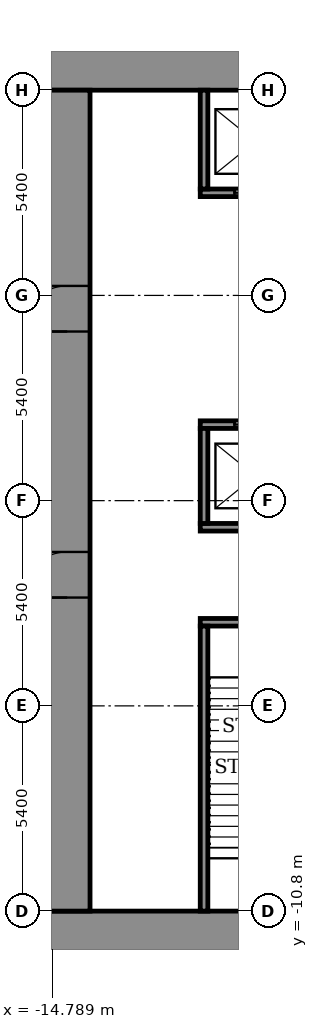
"""IFC4 building model, lengths in metres.
Left out: names, types, materials, properties, quantities, classifications, styles, units other than length and angle.
Written with IfcOpenShell. Run it as: python <this file> out.ifc"""

import sys

from ifc_helpers import new_model, si_unit, direction, frame, frame_2d, origin, place, context, subcontext, project, spatial, rectangle, extrude, element, fill, save


model = new_model("IFC4")
c1 = context("Model", 3, precision=1e-05, world=origin(), true_north=direction((0.0, 1.0)))
c2 = subcontext(c1, "Body", "Model", "MODEL_VIEW")
j1 = project(units=[si_unit("LENGTHUNIT", "METRE"), si_unit("PLANEANGLEUNIT", "RADIAN")], contexts=[c1])
p1 = place(None, origin())
s1 = spatial("IfcSite", under=j1, at=p1, CompositionType="ELEMENT")
p2 = place(p1, origin())
s2 = spatial("IfcBuilding", under=s1, at=p2, CompositionType="ELEMENT")
p3 = place(p2, origin())
s3 = spatial("IfcBuildingStorey", under=s2, at=p3, CompositionType="ELEMENT", Elevation=0.0)
p4 = place(p3, frame((-15.0, -11.4, 0.0), z_axis=(0.0, 0.0, 1.0), x_axis=(1.0, 0.0, 0.0)))
e1 = element("IfcWall", 1, at=p4, inside=s3, PredefinedType="SHEAR", context=c2, shape_type="SweptSolid", body=[
    extrude(rectangle(XDim=30.0, YDim=1.2, at=frame_2d((15.0, 0.0))), origin(), (0.0, 0.0, 1.0), 6.0),
])
p5 = place(p4, frame((5.725, 0.0, 0.0)))
e2 = element("IfcOpeningElement", 2, at=p5, cuts=e1, PredefinedType="OPENING", context=c2, shape_type="SweptSolid", body=[
    extrude(rectangle(XDim=1.5, YDim=2.1, at=frame_2d((0.75, 1.05))), frame((0.0, 0.61, 0.0), z_axis=(0.0, -1.0, 0.0), x_axis=(1.0, 0.0, 0.0)), (0.0, 0.0, 1.0), 1.22),
])
p6 = place(p4, frame((14.975, 0.0, 0.0)))
e3 = element("IfcOpeningElement", 3, at=p6, cuts=e1, PredefinedType="OPENING", context=c2, shape_type="SweptSolid", body=[
    extrude(rectangle(XDim=1.5, YDim=2.1, at=frame_2d((0.75, 1.05))), frame((0.0, 0.61, 0.0), z_axis=(0.0, -1.0, 0.0), x_axis=(1.0, 0.0, 0.0)), (0.0, 0.0, 1.0), 1.22),
])
p7 = place(p4, frame((24.275, 0.0, 0.0)))
e4 = element("IfcOpeningElement", 4, at=p7, cuts=e1, PredefinedType="OPENING", context=c2, shape_type="SweptSolid", body=[
    extrude(rectangle(XDim=1.5, YDim=2.1, at=frame_2d((0.75, 1.05))), frame((0.0, 0.61, 0.0), z_axis=(0.0, -1.0, 0.0), x_axis=(1.0, 0.0, 0.0)), (0.0, 0.0, 1.0), 1.22),
])
p8 = place(p3, frame((-15.0, 11.4, 0.0), z_axis=(0.0, 0.0, 1.0), x_axis=(1.0, 0.0, 0.0)))
e5 = element("IfcWall", 5, at=p8, inside=s3, PredefinedType="SHEAR", context=c2, shape_type="SweptSolid", body=[
    extrude(rectangle(XDim=30.0, YDim=1.2, at=frame_2d((15.0, 0.0))), origin(), (0.0, 0.0, 1.0), 6.0),
])
p9 = place(p3, frame((-14.4, -10.8, 0.0), z_axis=(0.0, 0.0, 1.0), x_axis=(0.0, 1.0, 0.0)))
e6 = element("IfcWall", 6, at=p9, inside=s3, PredefinedType="SHEAR", context=c2, shape_type="SweptSolid", body=[
    extrude(rectangle(XDim=21.6, YDim=1.2, at=frame_2d((10.8, 0.0))), origin(), (0.0, 0.0, 1.0), 6.0),
])
p10 = place(p9, frame((8.25, 0.0, 0.0)))
e7 = element("IfcOpeningElement", 7, at=p10, cuts=e6, PredefinedType="OPENING", context=c2, shape_type="SweptSolid", body=[
    extrude(rectangle(XDim=1.2, YDim=2.1, at=frame_2d((0.6, 1.05))), frame((0.0, 0.61, 0.0), z_axis=(0.0, -1.0, 0.0), x_axis=(1.0, 0.0, 0.0)), (0.0, 0.0, 1.0), 1.22),
])
p11 = place(p9, frame((15.25, 0.0, 0.0)))
e8 = element("IfcOpeningElement", 8, at=p11, cuts=e6, PredefinedType="OPENING", context=c2, shape_type="SweptSolid", body=[
    extrude(rectangle(XDim=1.2, YDim=2.1, at=frame_2d((0.6, 1.05))), frame((0.0, 0.61, 0.0), z_axis=(0.0, -1.0, 0.0), x_axis=(1.0, 0.0, 0.0)), (0.0, 0.0, 1.0), 1.22),
])
p12 = place(p3, frame((-10.9, -3.2, 0.0), z_axis=(0.0, 0.0, 1.0), x_axis=(1.0, 0.0, 0.0)))
e9 = element("IfcWall", 9, at=p12, inside=s3, PredefinedType="SHEAR", context=c2, shape_type="SweptSolid", body=[
    extrude(rectangle(XDim=21.8, YDim=0.2, at=frame_2d((10.9, 0.0))), origin(), (0.0, 0.0, 1.0), 5.45),
])
p13 = place(p12, frame((1.075, 0.0, 0.0)))
e10 = element("IfcOpeningElement", 10, at=p13, cuts=e9, PredefinedType="OPENING", context=c2, shape_type="SweptSolid", body=[
    extrude(rectangle(XDim=1.1, YDim=2.1, at=frame_2d((0.55, 1.05))), frame((0.0, 0.11, 0.0), z_axis=(0.0, -1.0, 0.0), x_axis=(1.0, 0.0, 0.0)), (0.0, 0.0, 1.0), 0.22),
])
p14 = place(p12, frame((10.325, 0.0, 0.0)))
e11 = element("IfcOpeningElement", 11, at=p14, cuts=e9, PredefinedType="OPENING", context=c2, shape_type="SweptSolid", body=[
    extrude(rectangle(XDim=1.1, YDim=2.1, at=frame_2d((0.55, 1.05))), frame((0.0, 0.11, 0.0), z_axis=(0.0, -1.0, 0.0), x_axis=(1.0, 0.0, 0.0)), (0.0, 0.0, 1.0), 0.22),
])
p15 = place(p12, frame((19.625, 0.0, 0.0)))
e12 = element("IfcOpeningElement", 12, at=p15, cuts=e9, PredefinedType="OPENING", context=c2, shape_type="SweptSolid", body=[
    extrude(rectangle(XDim=1.1, YDim=2.1, at=frame_2d((0.55, 1.05))), frame((0.0, 0.11, 0.0), z_axis=(0.0, -1.0, 0.0), x_axis=(1.0, 0.0, 0.0)), (0.0, 0.0, 1.0), 0.22),
])
p16 = place(p12, frame((5.7, 0.0, 0.0)))
e13 = element("IfcOpeningElement", 13, at=p16, cuts=e9, PredefinedType="OPENING", context=c2, shape_type="SweptSolid", body=[
    extrude(rectangle(XDim=1.1, YDim=2.1, at=frame_2d((0.55, 1.05))), frame((0.0, 0.11, 0.0), z_axis=(0.0, -1.0, 0.0), x_axis=(1.0, 0.0, 0.0)), (0.0, 0.0, 1.0), 0.22),
])
p17 = place(p12, frame((14.975, 0.0, 0.0)))
e14 = element("IfcOpeningElement", 14, at=p17, cuts=e9, PredefinedType="OPENING", context=c2, shape_type="SweptSolid", body=[
    extrude(rectangle(XDim=1.1, YDim=2.1, at=frame_2d((0.55, 1.05))), frame((0.0, 0.11, 0.0), z_axis=(0.0, -1.0, 0.0), x_axis=(1.0, 0.0, 0.0)), (0.0, 0.0, 1.0), 0.22),
])
p18 = place(p3, frame((-10.9, -0.7, 0.0), z_axis=(0.0, 0.0, 1.0), x_axis=(1.0, 0.0, 0.0)))
e15 = element("IfcWall", 15, at=p18, inside=s3, PredefinedType="SHEAR", context=c2, shape_type="SweptSolid", body=[
    extrude(rectangle(XDim=21.8, YDim=0.2, at=frame_2d((10.9, 0.0))), origin(), (0.0, 0.0, 1.0), 5.45),
])
p19 = place(p3, frame((-10.9, 2.0, 0.0), z_axis=(0.0, 0.0, 1.0), x_axis=(1.0, 0.0, 0.0)))
e16 = element("IfcWall", 16, at=p19, inside=s3, PredefinedType="SHEAR", context=c2, shape_type="SweptSolid", body=[
    extrude(rectangle(XDim=21.8, YDim=0.2, at=frame_2d((10.9, 0.0))), origin(), (0.0, 0.0, 1.0), 5.45),
])
p20 = place(p19, frame((0.9, 0.0, 0.0)))
e17 = element("IfcOpeningElement", 17, at=p20, cuts=e16, PredefinedType="OPENING", context=c2, shape_type="SweptSolid", body=[
    extrude(rectangle(XDim=1.1, YDim=2.1, at=frame_2d((0.55, 1.05))), frame((0.0, 0.11, 0.0), z_axis=(0.0, -1.0, 0.0), x_axis=(1.0, 0.0, 0.0)), (0.0, 0.0, 1.0), 0.22),
])
p21 = place(p19, frame((3.6, 0.0, 0.0)))
e18 = element("IfcOpeningElement", 18, at=p21, cuts=e16, PredefinedType="OPENING", context=c2, shape_type="SweptSolid", body=[
    extrude(rectangle(XDim=1.1, YDim=2.1, at=frame_2d((0.55, 1.05))), frame((0.0, 0.11, 0.0), z_axis=(0.0, -1.0, 0.0), x_axis=(1.0, 0.0, 0.0)), (0.0, 0.0, 1.0), 0.22),
])
p22 = place(p19, frame((6.3, 0.0, 0.0)))
e19 = element("IfcOpeningElement", 19, at=p22, cuts=e16, PredefinedType="OPENING", context=c2, shape_type="SweptSolid", body=[
    extrude(rectangle(XDim=1.1, YDim=2.1, at=frame_2d((0.55, 1.05))), frame((0.0, 0.11, 0.0), z_axis=(0.0, -1.0, 0.0), x_axis=(1.0, 0.0, 0.0)), (0.0, 0.0, 1.0), 0.22),
])
p23 = place(p19, frame((9.0, 0.0, 0.0)))
e20 = element("IfcOpeningElement", 20, at=p23, cuts=e16, PredefinedType="OPENING", context=c2, shape_type="SweptSolid", body=[
    extrude(rectangle(XDim=1.1, YDim=2.1, at=frame_2d((0.55, 1.05))), frame((0.0, 0.11, 0.0), z_axis=(0.0, -1.0, 0.0), x_axis=(1.0, 0.0, 0.0)), (0.0, 0.0, 1.0), 0.22),
])
p24 = place(p19, frame((11.7, 0.0, 0.0)))
e21 = element("IfcOpeningElement", 21, at=p24, cuts=e16, PredefinedType="OPENING", context=c2, shape_type="SweptSolid", body=[
    extrude(rectangle(XDim=1.1, YDim=2.1, at=frame_2d((0.55, 1.05))), frame((0.0, 0.11, 0.0), z_axis=(0.0, -1.0, 0.0), x_axis=(1.0, 0.0, 0.0)), (0.0, 0.0, 1.0), 0.22),
])
p25 = place(p19, frame((17.2, 0.0, 0.0)))
e22 = element("IfcOpeningElement", 22, at=p25, cuts=e16, PredefinedType="OPENING", context=c2, shape_type="SweptSolid", body=[
    extrude(rectangle(XDim=0.9, YDim=2.1, at=frame_2d((0.45, 1.05))), frame((0.0, 0.11, 0.0), z_axis=(0.0, -1.0, 0.0), x_axis=(1.0, 0.0, 0.0)), (0.0, 0.0, 1.0), 0.22),
])
p26 = place(p3, frame((-10.9, 8.1, 0.0), z_axis=(0.0, 0.0, 1.0), x_axis=(1.0, 0.0, 0.0)))
e23 = element("IfcWall", 23, at=p26, inside=s3, PredefinedType="SHEAR", context=c2, shape_type="SweptSolid", body=[
    extrude(rectangle(XDim=21.8, YDim=0.2, at=frame_2d((10.9, 0.0))), origin(), (0.0, 0.0, 1.0), 5.45),
])
p27 = place(p26, frame((0.9, 0.0, 0.0)))
e24 = element("IfcOpeningElement", 24, at=p27, cuts=e23, PredefinedType="OPENING", context=c2, shape_type="SweptSolid", body=[
    extrude(rectangle(XDim=1.1, YDim=2.1, at=frame_2d((0.55, 1.05))), frame((0.0, 0.11, 0.0), z_axis=(0.0, -1.0, 0.0), x_axis=(1.0, 0.0, 0.0)), (0.0, 0.0, 1.0), 0.22),
])
p28 = place(p26, frame((3.6, 0.0, 0.0)))
e25 = element("IfcOpeningElement", 25, at=p28, cuts=e23, PredefinedType="OPENING", context=c2, shape_type="SweptSolid", body=[
    extrude(rectangle(XDim=1.1, YDim=2.1, at=frame_2d((0.55, 1.05))), frame((0.0, 0.11, 0.0), z_axis=(0.0, -1.0, 0.0), x_axis=(1.0, 0.0, 0.0)), (0.0, 0.0, 1.0), 0.22),
])
p29 = place(p26, frame((6.3, 0.0, 0.0)))
e26 = element("IfcOpeningElement", 26, at=p29, cuts=e23, PredefinedType="OPENING", context=c2, shape_type="SweptSolid", body=[
    extrude(rectangle(XDim=1.1, YDim=2.1, at=frame_2d((0.55, 1.05))), frame((0.0, 0.11, 0.0), z_axis=(0.0, -1.0, 0.0), x_axis=(1.0, 0.0, 0.0)), (0.0, 0.0, 1.0), 0.22),
])
p30 = place(p26, frame((9.0, 0.0, 0.0)))
e27 = element("IfcOpeningElement", 27, at=p30, cuts=e23, PredefinedType="OPENING", context=c2, shape_type="SweptSolid", body=[
    extrude(rectangle(XDim=1.1, YDim=2.1, at=frame_2d((0.55, 1.05))), frame((0.0, 0.11, 0.0), z_axis=(0.0, -1.0, 0.0), x_axis=(1.0, 0.0, 0.0)), (0.0, 0.0, 1.0), 0.22),
])
p31 = place(p26, frame((11.7, 0.0, 0.0)))
e28 = element("IfcOpeningElement", 28, at=p31, cuts=e23, PredefinedType="OPENING", context=c2, shape_type="SweptSolid", body=[
    extrude(rectangle(XDim=1.1, YDim=2.1, at=frame_2d((0.55, 1.05))), frame((0.0, 0.11, 0.0), z_axis=(0.0, -1.0, 0.0), x_axis=(1.0, 0.0, 0.0)), (0.0, 0.0, 1.0), 0.22),
])
p32 = place(p26, frame((14.5, 0.0, 0.0)))
e29 = element("IfcOpeningElement", 29, at=p32, cuts=e23, PredefinedType="OPENING", context=c2, shape_type="SweptSolid", body=[
    extrude(rectangle(XDim=0.9, YDim=2.1, at=frame_2d((0.45, 1.05))), frame((0.0, 0.11, 0.0), z_axis=(0.0, -1.0, 0.0), x_axis=(1.0, 0.0, 0.0)), (0.0, 0.0, 1.0), 0.22),
])
p33 = place(p26, frame((18.55, 0.0, 0.0)))
e30 = element("IfcOpeningElement", 30, at=p33, cuts=e23, PredefinedType="OPENING", context=c2, shape_type="SweptSolid", body=[
    extrude(rectangle(XDim=0.9, YDim=2.1, at=frame_2d((0.45, 1.05))), frame((0.0, 0.11, 0.0), z_axis=(0.0, -1.0, 0.0), x_axis=(1.0, 0.0, 0.0)), (0.0, 0.0, 1.0), 0.22),
])
p34 = place(p3, frame((-10.8, -10.8, 0.0), z_axis=(0.0, 0.0, 1.0), x_axis=(0.0, 1.0, 0.0)))
e31 = element("IfcWall", 31, at=p34, inside=s3, PredefinedType="SHEAR", context=c2, shape_type="SweptSolid", body=[
    extrude(rectangle(XDim=7.5, YDim=0.2, at=frame_2d((3.75, 0.0))), origin(), (0.0, 0.0, 1.0), 5.45),
])
p35 = place(p3, frame((-10.8, -0.6, 0.0), z_axis=(0.0, 0.0, 1.0), x_axis=(0.0, 1.0, 0.0)))
e32 = element("IfcWall", 32, at=p35, inside=s3, PredefinedType="SHEAR", context=c2, shape_type="SweptSolid", body=[
    extrude(rectangle(XDim=2.5, YDim=0.2, at=frame_2d((1.25, 0.0))), origin(), (0.0, 0.0, 1.0), 5.45),
])
p36 = place(p3, frame((-10.8, 8.2, 0.0), z_axis=(0.0, 0.0, 1.0), x_axis=(0.0, 1.0, 0.0)))
e33 = element("IfcWall", 33, at=p36, inside=s3, PredefinedType="SHEAR", context=c2, shape_type="SweptSolid", body=[
    extrude(rectangle(XDim=2.6, YDim=0.2, at=frame_2d((1.3, 0.0))), origin(), (0.0, 0.0, 1.0), 5.45),
])
p37 = place(p10, origin())
e34 = element("IfcDoor", 34, at=p37, inside=s3, OperationType="DOUBLE_DOOR_SINGLE_SWING", PredefinedType="DOOR", context=c2, shape_type="SweptSolid", body=[
    extrude(rectangle(XDim=1.2, YDim=2.1, at=frame_2d((0.6, 1.05))), frame((0.0, 0.025, 0.0), z_axis=(0.0, -1.0, 0.0), x_axis=(1.0, 0.0, 0.0)), (0.0, 0.0, 1.0), 0.05),
])
fill(e7, e34)
p38 = place(p11, origin())
e35 = element("IfcDoor", 35, at=p38, inside=s3, OperationType="DOUBLE_DOOR_SINGLE_SWING", PredefinedType="DOOR", context=c2, shape_type="SweptSolid", body=[
    extrude(rectangle(XDim=1.2, YDim=2.1, at=frame_2d((0.6, 1.05))), frame((0.0, 0.025, 0.0), z_axis=(0.0, -1.0, 0.0), x_axis=(1.0, 0.0, 0.0)), (0.0, 0.0, 1.0), 0.05),
])
fill(e8, e35)
p39 = place(p20, origin())
e36 = element("IfcDoor", 36, at=p39, inside=s3, OperationType="SLIDING_TO_LEFT", PredefinedType="DOOR", context=c2, shape_type="SweptSolid", body=[
    extrude(rectangle(XDim=1.1, YDim=2.1, at=frame_2d((0.55, 1.05))), frame((0.0, 0.025, 0.0), z_axis=(0.0, -1.0, 0.0), x_axis=(1.0, 0.0, 0.0)), (0.0, 0.0, 1.0), 0.05),
])
fill(e17, e36)
p40 = place(p27, origin())
e37 = element("IfcDoor", 37, at=p40, inside=s3, OperationType="SLIDING_TO_LEFT", PredefinedType="DOOR", context=c2, shape_type="SweptSolid", body=[
    extrude(rectangle(XDim=1.1, YDim=2.1, at=frame_2d((0.55, 1.05))), frame((0.0, 0.025, 0.0), z_axis=(0.0, -1.0, 0.0), x_axis=(1.0, 0.0, 0.0)), (0.0, 0.0, 1.0), 0.05),
])
fill(e24, e37)
save(model, sys.argv[1])
